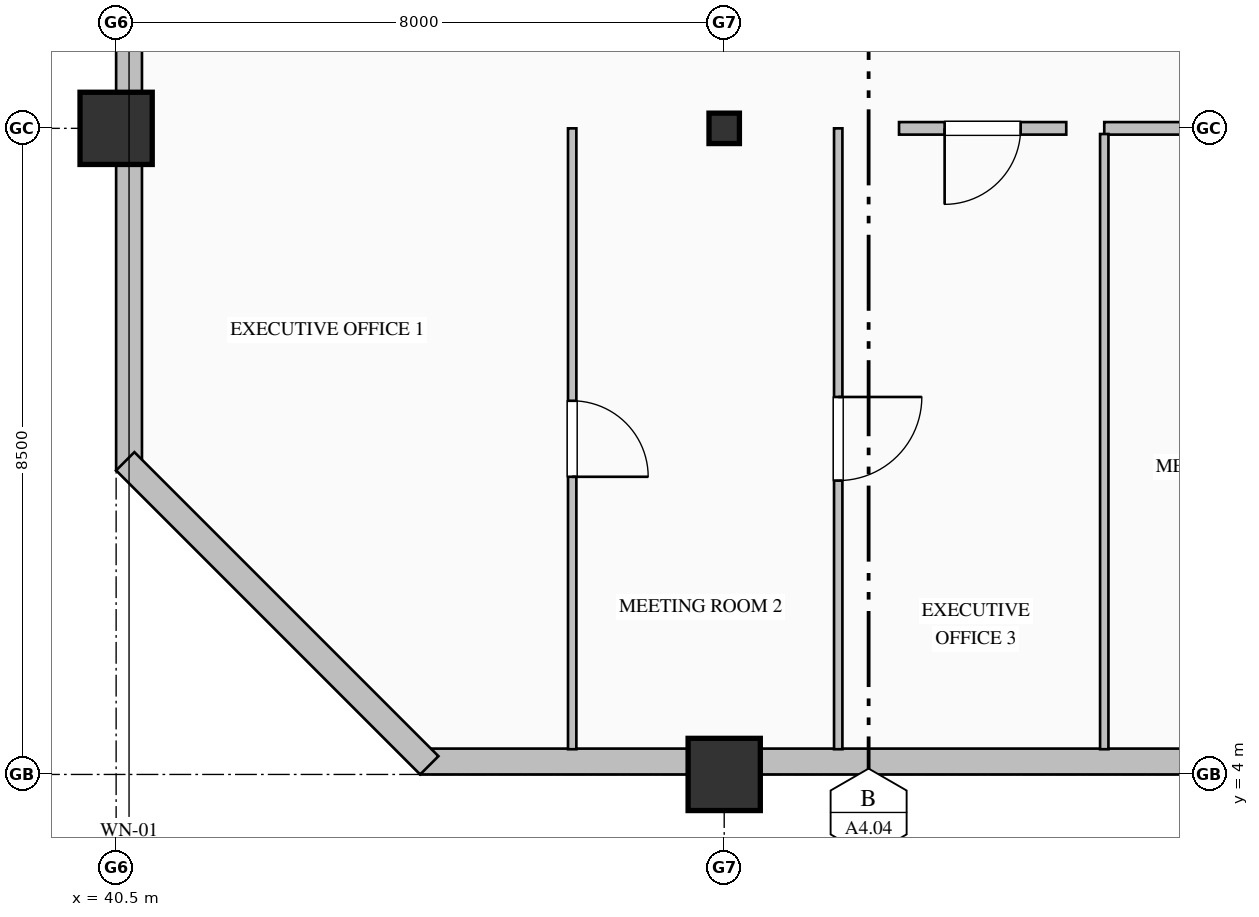
"""IFC4 building model, lengths in metres.
Left out: names, types, materials, properties, quantities, classifications, styles, units other than length and angle.
Written with IfcOpenShell. Run it as: python <this file> out.ifc"""

import sys

from ifc_helpers import new_model, si_unit, direction, frame, frame_2d, origin, origin_2d, place, context, subcontext, project, spatial, rectangle, hollow_rectangle, i_section, extrude, element, fill, save


model = new_model("IFC4")
c1 = context("Model", 3, precision=1e-05, world=origin(), true_north=direction((0.0, 1.0)))
c2 = subcontext(c1, "Body", "Model", "MODEL_VIEW")
j1 = project(units=[si_unit("LENGTHUNIT", "METRE"), si_unit("PLANEANGLEUNIT", "RADIAN")], contexts=[c1])
p1 = place(None, origin())
s1 = spatial("IfcSite", under=j1, at=p1, CompositionType="ELEMENT")
p2 = place(p1, origin())
s2 = spatial("IfcBuilding", under=s1, at=p2, CompositionType="ELEMENT")
p3 = place(p2, frame((0.0, 0.0, 123.0)))
s3 = spatial("IfcBuildingStorey", under=s2, at=p3, CompositionType="ELEMENT", Elevation=123.0)
for number, where, z_axis, x_axis in (
    (1, (40.5, 12.5, 0.0), (0.0, 0.0, 1.0), (1.0, 0.0, 0.0)),
    (2, (48.5, 4.0, 0.0), (0.0, 0.0, 1.0), (1.0, 0.0, 0.0)),
):
    element("IfcColumn", number, at=place(p3, frame(where, z_axis=z_axis, x_axis=x_axis)), inside=s3, PredefinedType="COLUMN", context=c2, shape_type="SweptSolid", body=[
        extrude(hollow_rectangle(XDim=0.95, YDim=0.95, WallThickness=0.036, at=origin_2d()), origin(), (0.0, 0.0, 1.0), 4.0),
    ])
p4 = place(p3, frame((48.5, 12.5, 0.0), z_axis=(0.0, 0.0, 1.0), x_axis=(1.0, 0.0, 0.0)))
e3 = element("IfcColumn", 3, at=p4, inside=s3, PredefinedType="COLUMN", context=c2, shape_type="SweptSolid", body=[
    extrude(i_section(OverallWidth=0.4, OverallDepth=0.4, WebThickness=0.013, FlangeThickness=0.021, FilletRadius=0.022, at=origin_2d()), origin(), (0.0, 0.0, 1.0), 4.0),
])
p5 = place(p3, frame((40.67, 8.0, 0.0), z_axis=(0.0, 0.0, 1.0), x_axis=(0.0, 1.0, 0.0)))
e4 = element("IfcWall", 4, at=p5, inside=s3, PredefinedType="SOLIDWALL", context=c2, shape_type="SweptSolid", body=[
    extrude(rectangle(XDim=20.34, YDim=0.34, at=frame_2d((10.17, 0.0))), origin(), (0.0, 0.0, 1.0), 3.165),
])
p6 = place(p5, frame((13.8, 0.0, 0.7)))
e5 = element("IfcOpeningElement", 5, at=p6, cuts=e4, PredefinedType="OPENING", context=c2, shape_type="SweptSolid", body=[
    extrude(rectangle(XDim=1.2, YDim=1.85, at=frame_2d((0.6, 0.925))), frame((0.0, 0.18, 0.0), z_axis=(0.0, -1.0, 0.0), x_axis=(1.0, 0.0, 0.0)), (0.0, 0.0, 1.0), 0.36),
])
p7 = place(p3, frame((60.0, 4.17, 0.0), z_axis=(0.0, 0.0, 1.0), x_axis=(-1.0, 0.0, 0.0)))
e6 = element("IfcWall", 6, at=p7, inside=s3, PredefinedType="SOLIDWALL", context=c2, shape_type="SweptSolid", body=[
    extrude(rectangle(XDim=15.5, YDim=0.34, at=frame_2d((7.75, 0.0))), origin(), (0.0, 0.0, 1.0), 3.265),
])
p8 = place(p3, frame((44.62, 4.12, 0.0), z_axis=(0.0, 0.0, 1.0), x_axis=(-0.707106781187, 0.707106781187, 0.0)))
e7 = element("IfcWall", 7, at=p8, inside=s3, PredefinedType="SOLIDWALL", context=c2, shape_type="SweptSolid", body=[
    extrude(rectangle(XDim=5.657, YDim=0.34, at=frame_2d((2.828, 0.0))), origin(), (0.0, 0.0, 1.0), 3.765),
])
p9 = place(p3, frame((53.0, 12.5, 0.0), z_axis=(0.0, 0.0, 1.0), x_axis=(-1.0, 0.0, 0.0)))
e8 = element("IfcWall", 8, at=p9, inside=s3, PredefinedType="PARTITIONING", context=c2, shape_type="SweptSolid", body=[
    extrude(rectangle(XDim=2.2, YDim=0.165, at=frame_2d((1.1, 0.0))), origin(), (0.0, 0.0, 1.0), 3.157),
])
p10 = place(p9, frame((0.6, 0.0, 0.0)))
e9 = element("IfcOpeningElement", 9, at=p10, cuts=e8, PredefinedType="OPENING", context=c2, shape_type="SweptSolid", body=[
    extrude(rectangle(XDim=1.0, YDim=2.15, at=frame_2d((0.5, 1.075))), frame((0.0, 0.093, 0.0), z_axis=(0.0, -1.0, 0.0), x_axis=(1.0, 0.0, 0.0)), (0.0, 0.0, 1.0), 0.185),
])
p11 = place(p3, frame((57.0, 12.5, 0.0), z_axis=(0.0, 0.0, 1.0), x_axis=(-1.0, 0.0, 0.0)))
e10 = element("IfcWall", 10, at=p11, inside=s3, PredefinedType="PARTITIONING", context=c2, shape_type="SweptSolid", body=[
    extrude(rectangle(XDim=3.5, YDim=0.165, at=frame_2d((1.75, 0.0))), origin(), (0.0, 0.0, 1.0), 3.157),
])
p12 = place(p11, frame((1.2, 0.0, 0.0)))
e11 = element("IfcOpeningElement", 11, at=p12, cuts=e10, PredefinedType="OPENING", context=c2, shape_type="SweptSolid", body=[
    extrude(rectangle(XDim=1.1, YDim=2.2, at=frame_2d((0.55, 1.1))), frame((0.0, 0.093, 0.0), z_axis=(0.0, -1.0, 0.0), x_axis=(1.0, 0.0, 0.0)), (0.0, 0.0, 1.0), 0.185),
])
p13 = place(p3, frame((46.5, 12.5, 0.0), z_axis=(0.0, 0.0, 1.0), x_axis=(0.0, -1.0, 0.0)))
e12 = element("IfcWall", 12, at=p13, inside=s3, PredefinedType="MOVABLE", context=c2, shape_type="SweptSolid", body=[
    extrude(rectangle(XDim=8.168, YDim=0.11, at=frame_2d((4.084, 0.0))), origin(), (0.0, 0.0, 1.0), 3.765),
])
p14 = place(p13, frame((3.584, 0.0, 0.0)))
e13 = element("IfcOpeningElement", 13, at=p14, cuts=e12, PredefinedType="OPENING", context=c2, shape_type="SweptSolid", body=[
    extrude(rectangle(XDim=1.0, YDim=2.15, at=frame_2d((0.5, 1.075))), frame((0.0, 0.065, 0.0), z_axis=(0.0, -1.0, 0.0), x_axis=(1.0, 0.0, 0.0)), (0.0, 0.0, 1.0), 0.13),
])
p15 = place(p3, frame((50.0, 12.5, 0.0), z_axis=(0.0, 0.0, 1.0), x_axis=(0.0, -1.0, 0.0)))
e14 = element("IfcWall", 14, at=p15, inside=s3, PredefinedType="MOVABLE", context=c2, shape_type="SweptSolid", body=[
    extrude(rectangle(XDim=8.168, YDim=0.11, at=frame_2d((4.084, 0.0))), origin(), (0.0, 0.0, 1.0), 3.765),
])
p16 = place(p15, frame((3.534, 0.0, 0.0)))
e15 = element("IfcOpeningElement", 15, at=p16, cuts=e14, PredefinedType="OPENING", context=c2, shape_type="SweptSolid", body=[
    extrude(rectangle(XDim=1.1, YDim=2.2, at=frame_2d((0.55, 1.1))), frame((0.0, 0.065, 0.0), z_axis=(0.0, -1.0, 0.0), x_axis=(1.0, 0.0, 0.0)), (0.0, 0.0, 1.0), 0.13),
])
p17 = place(p3, frame((53.5, 12.426, 0.0), z_axis=(0.0, 0.0, 1.0), x_axis=(0.0, -1.0, 0.0)))
e16 = element("IfcWall", 16, at=p17, inside=s3, PredefinedType="MOVABLE", context=c2, shape_type="SweptSolid", body=[
    extrude(rectangle(XDim=8.094, YDim=0.11, at=frame_2d((4.047, 0.0))), origin(), (0.0, 0.0, 1.0), 3.765),
])
p18 = place(p14, origin())
e17 = element("IfcDoor", 17, at=p18, inside=s3, OperationType="SINGLE_SWING_RIGHT", PredefinedType="DOOR", context=c2, shape_type="SweptSolid", body=[
    extrude(rectangle(XDim=1.0, YDim=2.15, at=frame_2d((0.5, 1.075))), frame((0.0, 0.025, 0.0), z_axis=(0.0, -1.0, 0.0), x_axis=(1.0, 0.0, 0.0)), (0.0, 0.0, 1.0), 0.05),
])
fill(e13, e17)
p19 = place(p16, origin())
e18 = element("IfcDoor", 18, at=p19, inside=s3, OperationType="SINGLE_SWING_LEFT", PredefinedType="DOOR", context=c2, shape_type="SweptSolid", body=[
    extrude(rectangle(XDim=1.1, YDim=2.2, at=frame_2d((0.55, 1.1))), frame((0.0, 0.025, 0.0), z_axis=(0.0, -1.0, 0.0), x_axis=(1.0, 0.0, 0.0)), (0.0, 0.0, 1.0), 0.05),
])
fill(e15, e18)
p20 = place(p10, origin())
e19 = element("IfcDoor", 19, at=p20, inside=s3, OperationType="SINGLE_SWING_RIGHT", PredefinedType="DOOR", context=c2, shape_type="SweptSolid", body=[
    extrude(rectangle(XDim=1.0, YDim=2.15, at=frame_2d((0.5, 1.075))), frame((0.0, 0.025, 0.0), z_axis=(0.0, -1.0, 0.0), x_axis=(1.0, 0.0, 0.0)), (0.0, 0.0, 1.0), 0.05),
])
fill(e9, e19)
save(model, sys.argv[1])
